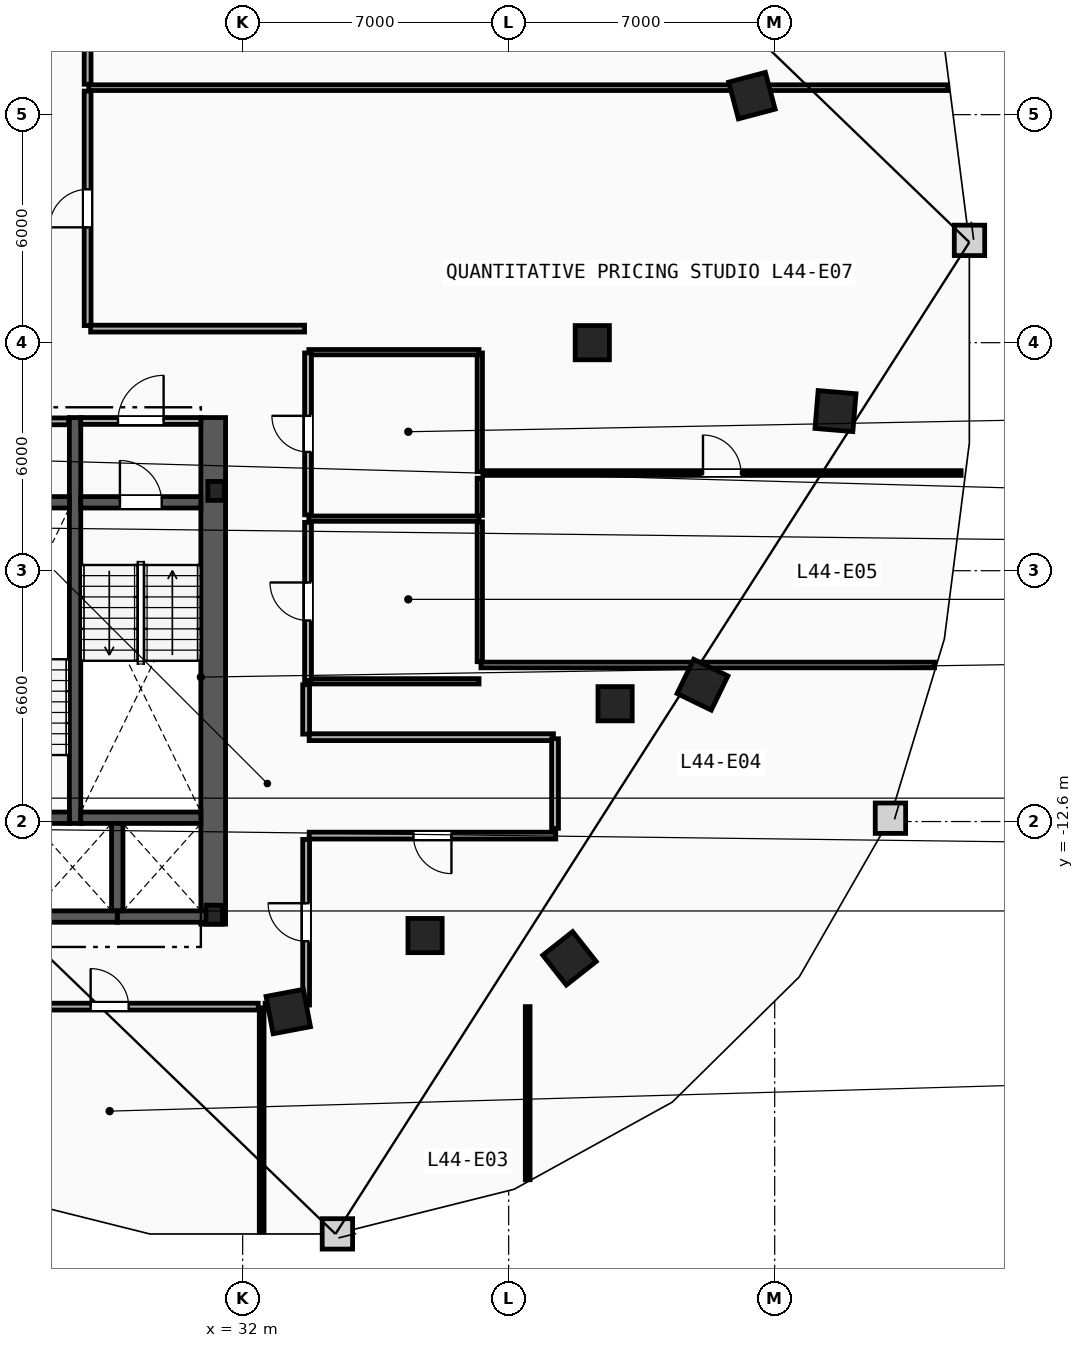
"""IFC4 building model, lengths in metres.
Left out: names, types, materials, properties, quantities, classifications, styles, units other than length and angle.
Written with IfcOpenShell. Run it as: python <this file> out.ifc"""

import sys

from ifc_helpers import new_model, si_unit, direction, frame, frame_2d, origin, origin_2d, place, context, subcontext, project, spatial, rectangle, i_section, extrude, element, fill, save


model = new_model("IFC4")
c1 = context("Model", 3, precision=1e-05, world=origin(), true_north=direction((0.0, 1.0)))
c2 = subcontext(c1, "Body", "Model", "MODEL_VIEW")
j1 = project(units=[si_unit("LENGTHUNIT", "METRE"), si_unit("PLANEANGLEUNIT", "RADIAN")], contexts=[c1])
p1 = place(None, origin())
s1 = spatial("IfcSite", under=j1, at=p1, CompositionType="ELEMENT")
p2 = place(p1, origin())
s2 = spatial("IfcBuilding", under=s1, at=p2, CompositionType="ELEMENT")
p3 = place(p2, frame((0.0, 0.0, 169.2)))
s3 = spatial("IfcBuildingStorey", under=s2, at=p3, CompositionType="ELEMENT", Elevation=169.2)
for number, where, z_axis, x_axis in (
    (1, (31.3, -3.9, 0.0), (0.0, 0.0, 1.0), (1.0, 0.0, 0.0)),
    (2, (31.25, -15.05, 0.0), (0.0, 0.0, 1.0), (1.0, 0.0, 0.0)),
):
    element("IfcColumn", number, at=place(p3, frame(where, z_axis=z_axis, x_axis=x_axis)), inside=s3, PredefinedType="COLUMN", context=c2, shape_type="SweptSolid", body=[
        extrude(i_section(OverallWidth=0.432, OverallDepth=0.498, WebThickness=0.056, FlangeThickness=0.089, FilletRadius=0.018, at=origin_2d()), origin(), (0.0, 0.0, 1.0), 3.6),
    ])
for number, where, z_axis, x_axis in (
    (3, (41.2, 0.0, 0.0), (0.0, 0.0, 1.0), (1.0, 0.0, 0.0)),
    (4, (41.8, -9.5, 0.0), (0.0, 0.0, 1.0), (1.0, 0.0, 0.0)),
    (5, (36.8, -15.6, 0.0), (0.0, 0.0, 1.0), (1.0, 0.0, 0.0)),
):
    element("IfcColumn", number, at=place(p3, frame(where, z_axis=z_axis, x_axis=x_axis)), inside=s3, PredefinedType="COLUMN", context=c2, shape_type="SweptSolid", body=[
        extrude(rectangle(XDim=0.9, YDim=0.9, at=origin_2d()), origin(), (0.0, 0.0, 1.0), 3.6),
    ])
for number, where, z_axis, x_axis in (
    (6, (33.2, -17.6, 0.0), (0.0, 0.0, 1.0), (0.983, 0.186, 0.0)),
    (7, (40.6, -16.2, 0.0), (0.0, 0.0, 1.0), (0.785, 0.619, 0.0)),
    (8, (44.1, -9.0, 0.0), (0.0, 0.0, 1.0), (0.437, 0.899, 0.0)),
    (9, (47.6, -1.8, 0.0), (0.0, 0.0, 1.0), (0.084, 0.997, 0.0)),
    (10, (45.4, 6.5, 0.0), (0.0, 0.0, 1.0), (-0.256, 0.967, 0.0)),
):
    element("IfcColumn", number, at=place(p3, frame(where, z_axis=z_axis, x_axis=x_axis)), inside=s3, PredefinedType="COLUMN", context=c2, shape_type="SweptSolid", body=[
        extrude(rectangle(XDim=1.0, YDim=1.0, at=origin_2d()), origin(), (0.0, 0.0, 1.0), 3.6),
    ])
p4 = place(p3, frame((31.225, -15.3, 0.0), z_axis=(0.0, 0.0, 1.0), x_axis=(0.0, 1.0, 0.0)))
e11 = element("IfcWall", 11, at=p4, inside=s3, PredefinedType="SHEAR", context=c2, shape_type="SweptSolid", body=[
    extrude(rectangle(XDim=13.33, YDim=0.65, at=frame_2d((6.665, 0.0))), origin(), (0.0, 0.0, 1.0), 3.36),
])
p5 = place(p3, frame((27.59, -12.65, 0.0), z_axis=(0.0, 0.0, 1.0), x_axis=(0.0, 1.0, 0.0)))
e12 = element("IfcWall", 12, at=p5, inside=s3, PredefinedType="SHEAR", context=c2, shape_type="SweptSolid", body=[
    extrude(rectangle(XDim=10.68, YDim=0.3, at=frame_2d((5.34, 0.0))), origin(), (0.0, 0.0, 1.0), 3.36),
])
p6 = place(p3, frame((27.74, -4.2, 0.0), z_axis=(0.0, 0.0, 1.0), x_axis=(1.0, 0.0, 0.0)))
e13 = element("IfcWall", 13, at=p6, inside=s3, PredefinedType="SHEAR", context=c2, shape_type="SweptSolid", body=[
    extrude(rectangle(XDim=3.16, YDim=0.3, at=frame_2d((1.58, 0.0))), origin(), (0.0, 0.0, 1.0), 3.36),
])
p7 = place(p6, frame((1.03, 0.0, 0.0)))
e14 = element("IfcOpeningElement", 14, at=p7, cuts=e13, PredefinedType="OPENING", context=c2, shape_type="SweptSolid", body=[
    extrude(rectangle(XDim=1.1, YDim=2.15, at=frame_2d((0.55, 1.075))), frame((0.0, 0.16, 0.0), z_axis=(0.0, -1.0, 0.0), x_axis=(1.0, 0.0, 0.0)), (0.0, 0.0, 1.0), 0.32),
])
p8 = place(p3, frame((27.74, -12.5, 0.0), z_axis=(0.0, 0.0, 1.0), x_axis=(1.0, 0.0, 0.0)))
e15 = element("IfcWall", 15, at=p8, inside=s3, PredefinedType="SHEAR", context=c2, shape_type="SweptSolid", body=[
    extrude(rectangle(XDim=3.16, YDim=0.3, at=frame_2d((1.58, 0.0))), origin(), (0.0, 0.0, 1.0), 3.36),
])
p9 = place(p3, frame((24.28, -12.5, 0.0), z_axis=(0.0, 0.0, 1.0), x_axis=(1.0, 0.0, 0.0)))
e16 = element("IfcWall", 16, at=p9, inside=s3, PredefinedType="SHEAR", context=c2, shape_type="SweptSolid", body=[
    extrude(rectangle(XDim=3.16, YDim=0.3, at=frame_2d((1.58, 0.0))), origin(), (0.0, 0.0, 1.0), 3.36),
])
p10 = place(p9, frame((1.03, 0.0, 0.0)))
e17 = element("IfcOpeningElement", 17, at=p10, cuts=e16, PredefinedType="OPENING", context=c2, shape_type="SweptSolid", body=[
    extrude(rectangle(XDim=1.1, YDim=2.15, at=frame_2d((0.55, 1.075))), frame((0.0, 0.16, 0.0), z_axis=(0.0, -1.0, 0.0), x_axis=(1.0, 0.0, 0.0)), (0.0, 0.0, 1.0), 0.32),
])
p11 = place(p3, frame((24.28, -4.2, 0.0), z_axis=(0.0, 0.0, 1.0), x_axis=(1.0, 0.0, 0.0)))
e18 = element("IfcWall", 18, at=p11, inside=s3, PredefinedType="SHEAR", context=c2, shape_type="SweptSolid", body=[
    extrude(rectangle(XDim=3.16, YDim=0.3, at=frame_2d((1.58, 0.0))), origin(), (0.0, 0.0, 1.0), 3.36),
])
p12 = place(p3, frame((27.74, -2.06, 0.0), z_axis=(0.0, 0.0, 1.0), x_axis=(1.0, 0.0, 0.0)))
e19 = element("IfcWall", 19, at=p12, inside=s3, PredefinedType="PARTITIONING", context=c2, shape_type="SweptSolid", body=[
    extrude(rectangle(XDim=3.16, YDim=0.18, at=frame_2d((1.58, 0.0))), origin(), (0.0, 0.0, 1.0), 3.36),
])
p13 = place(p12, frame((0.98, 0.0, 0.0)))
e20 = element("IfcOpeningElement", 20, at=p13, cuts=e19, PredefinedType="OPENING", context=c2, shape_type="SweptSolid", body=[
    extrude(rectangle(XDim=1.2, YDim=2.15, at=frame_2d((0.6, 1.075))), frame((0.0, 0.1, 0.0), z_axis=(0.0, -1.0, 0.0), x_axis=(1.0, 0.0, 0.0)), (0.0, 0.0, 1.0), 0.2),
])
p14 = place(p3, frame((28.7, -15.1, 0.0), z_axis=(0.0, 0.0, 1.0), x_axis=(1.0, 0.0, 0.0)))
e21 = element("IfcWall", 21, at=p14, inside=s3, PredefinedType="SHEAR", context=c2, shape_type="SweptSolid", body=[
    extrude(rectangle(XDim=2.5, YDim=0.3, at=frame_2d((1.25, 0.0))), origin(), (0.0, 0.0, 1.0), 3.36),
])
p15 = place(p3, frame((28.7, -14.95, 0.0), z_axis=(0.0, 0.0, 1.0), x_axis=(0.0, 1.0, 0.0)))
e22 = element("IfcWall", 22, at=p15, inside=s3, PredefinedType="SHEAR", context=c2, shape_type="SweptSolid", body=[
    extrude(rectangle(XDim=2.3, YDim=0.3, at=frame_2d((1.15, 0.0))), origin(), (0.0, 0.0, 1.0), 3.36),
])
p16 = place(p3, frame((26.2, -15.1, 0.0), z_axis=(0.0, 0.0, 1.0), x_axis=(1.0, 0.0, 0.0)))
e23 = element("IfcWall", 23, at=p16, inside=s3, PredefinedType="SHEAR", context=c2, shape_type="SweptSolid", body=[
    extrude(rectangle(XDim=2.5, YDim=0.3, at=frame_2d((1.25, 0.0))), origin(), (0.0, 0.0, 1.0), 3.36),
])
p17 = place(p3, frame((24.3, -2.07, 0.0), z_axis=(0.0, 0.0, 1.0), x_axis=(1.0, 0.0, 0.0)))
e24 = element("IfcWall", 24, at=p17, inside=s3, PredefinedType="PARTITIONING", context=c2, shape_type="SweptSolid", body=[
    extrude(rectangle(XDim=3.12, YDim=0.18, at=frame_2d((1.56, 0.0))), origin(), (0.0, 0.0, 1.0), 3.36),
])
p18 = place(p17, frame((1.085, 0.0, 0.0)))
e25 = element("IfcOpeningElement", 25, at=p18, cuts=e24, PredefinedType="OPENING", context=c2, shape_type="SweptSolid", body=[
    extrude(rectangle(XDim=0.95, YDim=2.1, at=frame_2d((0.475, 1.05))), frame((0.0, 0.1, 0.0), z_axis=(0.0, -1.0, 0.0), x_axis=(1.0, 0.0, 0.0)), (0.0, 0.0, 1.0), 0.2),
])
p19 = place(p3, frame((38.24, -8.395, 0.0), z_axis=(0.0, 0.0, 1.0), x_axis=(0.0, 1.0, 0.0)))
e26 = element("IfcWall", 26, at=p19, inside=s3, PredefinedType="PARTITIONING", context=c2, shape_type="SweptSolid", body=[
    extrude(rectangle(XDim=3.68, YDim=0.14, at=frame_2d((1.84, 0.0))), origin(), (0.0, 0.0, 1.0), 3.36),
])
p20 = place(p3, frame((38.24, -4.545, 0.0), z_axis=(0.0, 0.0, 1.0), x_axis=(0.0, 1.0, 0.0)))
e27 = element("IfcWall", 27, at=p20, inside=s3, PredefinedType="PARTITIONING", context=c2, shape_type="SweptSolid", body=[
    extrude(rectangle(XDim=0.98, YDim=0.14, at=frame_2d((0.49, 0.0))), origin(), (0.0, 0.0, 1.0), 3.36),
])
p21 = place(p3, frame((38.24, -3.395, 0.0), z_axis=(0.0, 0.0, 1.0), x_axis=(0.0, 1.0, 0.0)))
e28 = element("IfcWall", 28, at=p21, inside=s3, PredefinedType="PARTITIONING", context=c2, shape_type="SweptSolid", body=[
    extrude(rectangle(XDim=3.125, YDim=0.14, at=frame_2d((1.562, 0.0))), origin(), (0.0, 0.0, 1.0), 3.36),
])
for number, where, z_axis, x_axis in (
    (29, (33.74, -0.25, 0.0), (0.0, 0.0, 1.0), (1.0, 0.0, 0.0)),
    (30, (33.74, -4.63, 0.0), (0.0, 0.0, 1.0), (1.0, 0.0, 0.0)),
    (31, (33.74, -8.91, 0.0), (0.0, 0.0, 1.0), (1.0, 0.0, 0.0)),
):
    element("IfcWall", number, at=place(p3, frame(where, z_axis=z_axis, x_axis=x_axis)), inside=s3, PredefinedType="PARTITIONING", context=c2, shape_type="SweptSolid", body=[
        extrude(rectangle(XDim=4.48, YDim=0.14, at=frame_2d((2.24, 0.0))), origin(), (0.0, 0.0, 1.0), 3.36),
    ])
p22 = place(p3, frame((33.72, -4.53, 0.0), z_axis=(0.0, 0.0, 1.0), x_axis=(0.0, 1.0, 0.0)))
e32 = element("IfcWall", 32, at=p22, inside=s3, PredefinedType="PARTITIONING", context=c2, shape_type="SweptSolid", body=[
    extrude(rectangle(XDim=4.26, YDim=0.18, at=frame_2d((2.13, 0.0))), origin(), (0.0, 0.0, 1.0), 3.36),
])
p23 = place(p22, frame((1.655, 0.0, 0.0)))
e33 = element("IfcOpeningElement", 33, at=p23, cuts=e32, PredefinedType="OPENING", context=c2, shape_type="SweptSolid", body=[
    extrude(rectangle(XDim=0.95, YDim=2.1, at=frame_2d((0.475, 1.05))), frame((0.0, 0.1, 0.0), z_axis=(0.0, -1.0, 0.0), x_axis=(1.0, 0.0, 0.0)), (0.0, 0.0, 1.0), 0.2),
])
p24 = place(p3, frame((33.72, -8.89, 0.0), z_axis=(0.0, 0.0, 1.0), x_axis=(0.0, 1.0, 0.0)))
e34 = element("IfcWall", 34, at=p24, inside=s3, PredefinedType="PARTITIONING", context=c2, shape_type="SweptSolid", body=[
    extrude(rectangle(XDim=4.16, YDim=0.18, at=frame_2d((2.08, 0.0))), origin(), (0.0, 0.0, 1.0), 3.36),
])
p25 = place(p24, frame((1.58, 0.0, 0.0)))
e35 = element("IfcOpeningElement", 35, at=p25, cuts=e34, PredefinedType="OPENING", context=c2, shape_type="SweptSolid", body=[
    extrude(rectangle(XDim=1.0, YDim=2.15, at=frame_2d((0.5, 1.075))), frame((0.0, 0.1, 0.0), z_axis=(0.0, -1.0, 0.0), x_axis=(1.0, 0.0, 0.0)), (0.0, 0.0, 1.0), 0.2),
])
p26 = place(p3, frame((27.95, 6.71, 0.0), z_axis=(0.0, 0.0, 1.0), x_axis=(1.0, 0.0, 0.0)))
e36 = element("IfcWall", 36, at=p26, inside=s3, PredefinedType="PARTITIONING", context=c2, shape_type="SweptSolid", body=[
    extrude(rectangle(XDim=22.603, YDim=0.15, at=frame_2d((11.302, 0.0))), origin(), (0.0, 0.0, 1.0), 3.36),
])
p27 = place(p3, frame((38.27, -8.48, 0.0), z_axis=(0.0, 0.0, 1.0), x_axis=(1.0, 0.0, 0.0)))
e37 = element("IfcWall", 37, at=p27, inside=s3, PredefinedType="PARTITIONING", context=c2, shape_type="SweptSolid", body=[
    extrude(rectangle(XDim=11.936, YDim=0.15, at=frame_2d((5.968, 0.0))), origin(), (0.0, 0.0, 1.0), 3.36),
])
p28 = place(p3, frame((32.5, -23.402, 0.0), z_axis=(0.0, 0.0, 1.0), x_axis=(0.0, 1.0, 0.0)))
e38 = element("IfcWall", 38, at=p28, inside=s3, PredefinedType="PARTITIONING", context=c2, shape_type="SweptSolid", body=[
    extrude(rectangle(XDim=5.902, YDim=0.125, at=frame_2d((2.951, 0.0))), origin(), (0.0, 0.0, 1.0), 3.36),
])
p29 = place(p3, frame((39.5, -22.025, 0.0), z_axis=(0.0, 0.0, 1.0), x_axis=(0.0, 1.0, 0.0)))
e39 = element("IfcWall", 39, at=p29, inside=s3, PredefinedType="PARTITIONING", context=c2, shape_type="SweptSolid", body=[
    extrude(rectangle(XDim=4.555, YDim=0.125, at=frame_2d((2.278, 0.0))), origin(), (0.0, 0.0, 1.0), 3.36),
])
p30 = place(p3, frame((24.59, -17.47, 0.0), z_axis=(0.0, 0.0, 1.0), x_axis=(1.0, 0.0, 0.0)))
e40 = element("IfcWall", 40, at=p30, inside=s3, PredefinedType="PARTITIONING", context=c2, shape_type="SweptSolid", body=[
    extrude(rectangle(XDim=7.82, YDim=0.18, at=frame_2d((3.91, 0.0))), origin(), (0.0, 0.0, 1.0), 3.36),
])
p31 = place(p30, frame((3.41, 0.0, 0.0)))
e41 = element("IfcOpeningElement", 41, at=p31, cuts=e40, PredefinedType="OPENING", context=c2, shape_type="SweptSolid", body=[
    extrude(rectangle(XDim=1.0, YDim=2.15, at=frame_2d((0.5, 1.075))), frame((0.0, 0.1, 0.0), z_axis=(0.0, -1.0, 0.0), x_axis=(1.0, 0.0, 0.0)), (0.0, 0.0, 1.0), 0.2),
])
p32 = place(p3, frame((33.67, -17.428, 0.0), z_axis=(0.0, 0.0, 1.0), x_axis=(0.0, 1.0, 0.0)))
e42 = element("IfcWall", 42, at=p32, inside=s3, PredefinedType="PARTITIONING", context=c2, shape_type="SweptSolid", body=[
    extrude(rectangle(XDim=4.358, YDim=0.18, at=frame_2d((2.179, 0.0))), origin(), (0.0, 0.0, 1.0), 3.36),
])
p33 = place(p32, frame((1.679, 0.0, 0.0)))
e43 = element("IfcOpeningElement", 43, at=p33, cuts=e42, PredefinedType="OPENING", context=c2, shape_type="SweptSolid", body=[
    extrude(rectangle(XDim=1.0, YDim=2.15, at=frame_2d((0.5, 1.075))), frame((0.0, 0.1, 0.0), z_axis=(0.0, -1.0, 0.0), x_axis=(1.0, 0.0, 0.0)), (0.0, 0.0, 1.0), 0.2),
])
p34 = place(p3, frame((32.59, -17.47, 0.0), z_axis=(0.0, 0.0, 1.0), x_axis=(1.0, 0.0, 0.0)))
e44 = element("IfcWall", 44, at=p34, inside=s3, PredefinedType="PARTITIONING", context=c2, shape_type="SweptSolid", body=[
    extrude(rectangle(XDim=1.038, YDim=0.18, at=frame_2d((0.519, 0.0))), origin(), (0.0, 0.0, 1.0), 3.36),
])
p35 = place(p3, frame((40.239, -12.97, 0.0), z_axis=(0.0, 0.0, 1.0), x_axis=(-1.0, 0.0, 0.0)))
e45 = element("IfcWall", 45, at=p35, inside=s3, PredefinedType="PARTITIONING", context=c2, shape_type="SweptSolid", body=[
    extrude(rectangle(XDim=6.489, YDim=0.18, at=frame_2d((3.244, 0.0))), origin(), (0.0, 0.0, 1.0), 3.36),
])
p36 = place(p35, frame((2.744, 0.0, 0.0)))
e46 = element("IfcOpeningElement", 46, at=p36, cuts=e45, PredefinedType="OPENING", context=c2, shape_type="SweptSolid", body=[
    extrude(rectangle(XDim=1.0, YDim=2.15, at=frame_2d((0.5, 1.075))), frame((0.0, 0.1, 0.0), z_axis=(0.0, -1.0, 0.0), x_axis=(1.0, 0.0, 0.0)), (0.0, 0.0, 1.0), 0.2),
])
p37 = place(p3, frame((40.178, -10.38, 0.0), z_axis=(0.0, 0.0, 1.0), x_axis=(-1.0, 0.0, 0.0)))
e47 = element("IfcWall", 47, at=p37, inside=s3, PredefinedType="PARTITIONING", context=c2, shape_type="SweptSolid", body=[
    extrude(rectangle(XDim=6.428, YDim=0.18, at=frame_2d((3.214, 0.0))), origin(), (0.0, 0.0, 1.0), 3.36),
])
p38 = place(p3, frame((40.22, -12.779, 0.0), z_axis=(0.0, 0.0, 1.0), x_axis=(0.0, 1.0, 0.0)))
e48 = element("IfcWall", 48, at=p38, inside=s3, PredefinedType="PARTITIONING", context=c2, shape_type="SweptSolid", body=[
    extrude(rectangle(XDim=2.357, YDim=0.18, at=frame_2d((1.179, 0.0))), origin(), (0.0, 0.0, 1.0), 3.36),
])
p39 = place(p3, frame((33.67, -10.3, 0.0), z_axis=(0.0, 0.0, 1.0), x_axis=(0.0, 1.0, 0.0)))
e49 = element("IfcWall", 49, at=p39, inside=s3, PredefinedType="PARTITIONING", context=c2, shape_type="SweptSolid", body=[
    extrude(rectangle(XDim=1.299, YDim=0.18, at=frame_2d((0.649, 0.0))), origin(), (0.0, 0.0, 1.0), 3.36),
])
p40 = place(p3, frame((27.92, 0.45, 0.0), z_axis=(0.0, 0.0, 1.0), x_axis=(0.0, 1.0, 0.0)))
e50 = element("IfcWall", 50, at=p40, inside=s3, PredefinedType="PARTITIONING", context=c2, shape_type="SweptSolid", body=[
    extrude(rectangle(XDim=6.17, YDim=0.18, at=frame_2d((3.085, 0.0))), origin(), (0.0, 0.0, 1.0), 3.36),
])
p41 = place(p40, frame((2.585, 0.0, 0.0)))
e51 = element("IfcOpeningElement", 51, at=p41, cuts=e50, PredefinedType="OPENING", context=c2, shape_type="SweptSolid", body=[
    extrude(rectangle(XDim=1.0, YDim=2.15, at=frame_2d((0.5, 1.075))), frame((0.0, 0.1, 0.0), z_axis=(0.0, -1.0, 0.0), x_axis=(1.0, 0.0, 0.0)), (0.0, 0.0, 1.0), 0.2),
])
p42 = place(p3, frame((33.628, 0.37, 0.0), z_axis=(0.0, 0.0, 1.0), x_axis=(-1.0, 0.0, 0.0)))
e52 = element("IfcWall", 52, at=p42, inside=s3, PredefinedType="PARTITIONING", context=c2, shape_type="SweptSolid", body=[
    extrude(rectangle(XDim=5.628, YDim=0.18, at=frame_2d((2.814, 0.0))), origin(), (0.0, 0.0, 1.0), 3.36),
])
p43 = place(p3, frame((27.92, 6.8, 0.0), z_axis=(0.0, 0.0, 1.0), x_axis=(0.0, 1.0, 0.0)))
e53 = element("IfcWall", 53, at=p43, inside=s3, PredefinedType="PARTITIONING", context=c2, shape_type="SweptSolid", body=[
    extrude(rectangle(XDim=4.378, YDim=0.18, at=frame_2d((2.189, 0.0))), origin(), (0.0, 0.0, 1.0), 3.36),
])
p44 = place(p3, frame((38.32, -3.43, 0.0), z_axis=(0.0, 0.0, 1.0), x_axis=(1.0, 0.0, 0.0)))
e54 = element("IfcWall", 54, at=p44, inside=s3, PredefinedType="PARTITIONING", context=c2, shape_type="SweptSolid", body=[
    extrude(rectangle(XDim=12.585, YDim=0.125, at=frame_2d((6.293, 0.0))), origin(), (0.0, 0.0, 1.0), 3.36),
])
p45 = place(p44, frame((5.793, 0.0, 0.0)))
e55 = element("IfcOpeningElement", 55, at=p45, cuts=e54, PredefinedType="OPENING", context=c2, shape_type="SweptSolid", body=[
    extrude(rectangle(XDim=1.0, YDim=2.15, at=frame_2d((0.5, 1.075))), frame((0.0, 0.073, 0.0), z_axis=(0.0, -1.0, 0.0), x_axis=(1.0, 0.0, 0.0)), (0.0, 0.0, 1.0), 0.145),
])
p46 = place(p7, origin())
e56 = element("IfcDoor", 56, at=p46, inside=s3, OperationType="SINGLE_SWING_LEFT", PredefinedType="DOOR", context=c2, shape_type="SweptSolid", body=[
    extrude(rectangle(XDim=1.1, YDim=2.15, at=frame_2d((0.55, 1.075))), frame((0.0, 0.025, 0.0), z_axis=(0.0, -1.0, 0.0), x_axis=(1.0, 0.0, 0.0)), (0.0, 0.0, 1.0), 0.05),
])
fill(e14, e56)
p47 = place(p13, origin())
e57 = element("IfcDoor", 57, at=p47, inside=s3, OperationType="SINGLE_SWING_RIGHT", PredefinedType="DOOR", context=c2, shape_type="SweptSolid", body=[
    extrude(rectangle(XDim=1.2, YDim=2.15, at=frame_2d((0.6, 1.075))), frame((0.0, 0.025, 0.0), z_axis=(0.0, -1.0, 0.0), x_axis=(1.0, 0.0, 0.0)), (0.0, 0.0, 1.0), 0.05),
])
fill(e20, e57)
p48 = place(p45, origin())
e58 = element("IfcDoor", 58, at=p48, inside=s3, OperationType="SINGLE_SWING_LEFT", PredefinedType="DOOR", context=c2, shape_type="SweptSolid", body=[
    extrude(rectangle(XDim=1.0, YDim=2.15, at=frame_2d((0.5, 1.075))), frame((0.0, 0.025, 0.0), z_axis=(0.0, -1.0, 0.0), x_axis=(1.0, 0.0, 0.0)), (0.0, 0.0, 1.0), 0.05),
])
fill(e55, e58)
p49 = place(p31, origin())
e59 = element("IfcDoor", 59, at=p49, inside=s3, OperationType="SINGLE_SWING_LEFT", PredefinedType="DOOR", context=c2, shape_type="SweptSolid", body=[
    extrude(rectangle(XDim=1.0, YDim=2.15, at=frame_2d((0.5, 1.075))), frame((0.0, 0.025, 0.0), z_axis=(0.0, -1.0, 0.0), x_axis=(1.0, 0.0, 0.0)), (0.0, 0.0, 1.0), 0.05),
])
fill(e41, e59)
p50 = place(p36, origin())
e60 = element("IfcDoor", 60, at=p50, inside=s3, OperationType="SINGLE_SWING_LEFT", PredefinedType="DOOR", context=c2, shape_type="SweptSolid", body=[
    extrude(rectangle(XDim=1.0, YDim=2.15, at=frame_2d((0.5, 1.075))), frame((0.0, 0.025, 0.0), z_axis=(0.0, -1.0, 0.0), x_axis=(1.0, 0.0, 0.0)), (0.0, 0.0, 1.0), 0.05),
])
fill(e46, e60)
p51 = place(p41, origin())
e61 = element("IfcDoor", 61, at=p51, inside=s3, OperationType="SINGLE_SWING_LEFT", PredefinedType="DOOR", context=c2, shape_type="SweptSolid", body=[
    extrude(rectangle(XDim=1.0, YDim=2.15, at=frame_2d((0.5, 1.075))), frame((0.0, 0.025, 0.0), z_axis=(0.0, -1.0, 0.0), x_axis=(1.0, 0.0, 0.0)), (0.0, 0.0, 1.0), 0.05),
])
fill(e51, e61)
p52 = place(p33, origin())
e62 = element("IfcDoor", 62, at=p52, inside=s3, OperationType="SINGLE_SWING_RIGHT", PredefinedType="DOOR", context=c2, shape_type="SweptSolid", body=[
    extrude(rectangle(XDim=1.0, YDim=2.15, at=frame_2d((0.5, 1.075))), frame((0.0, 0.025, 0.0), z_axis=(0.0, -1.0, 0.0), x_axis=(1.0, 0.0, 0.0)), (0.0, 0.0, 1.0), 0.05),
])
fill(e43, e62)
p53 = place(p23, origin())
e63 = element("IfcDoor", 63, at=p53, inside=s3, OperationType="SINGLE_SWING_RIGHT", PredefinedType="DOOR", context=c2, shape_type="SweptSolid", body=[
    extrude(rectangle(XDim=0.95, YDim=2.1, at=frame_2d((0.475, 1.05))), frame((0.0, 0.025, 0.0), z_axis=(0.0, -1.0, 0.0), x_axis=(1.0, 0.0, 0.0)), (0.0, 0.0, 1.0), 0.05),
])
fill(e33, e63)
p54 = place(p25, origin())
e64 = element("IfcDoor", 64, at=p54, inside=s3, OperationType="SINGLE_SWING_RIGHT", PredefinedType="DOOR", context=c2, shape_type="SweptSolid", body=[
    extrude(rectangle(XDim=1.0, YDim=2.15, at=frame_2d((0.5, 1.075))), frame((0.0, 0.025, 0.0), z_axis=(0.0, -1.0, 0.0), x_axis=(1.0, 0.0, 0.0)), (0.0, 0.0, 1.0), 0.05),
])
fill(e35, e64)
save(model, sys.argv[1])
